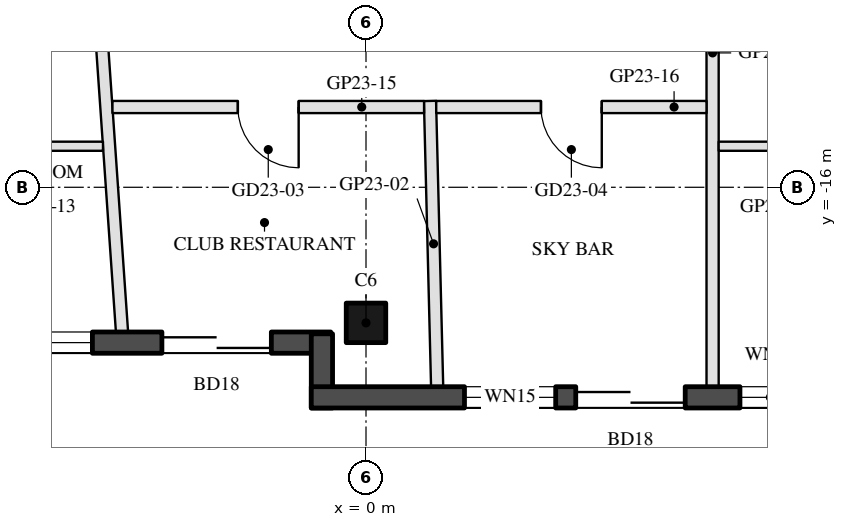
"""IFC4 building model, lengths in metres.
Left out: names, types, materials, properties, quantities, classifications, styles, units other than length and angle.
Written with IfcOpenShell. Run it as: python <this file> out.ifc"""

import sys

from ifc_helpers import new_model, si_unit, direction, frame, frame_2d, origin, origin_2d, place, context, subcontext, project, spatial, rectangle, hollow_rectangle, extrude, boolean, halfspace, element, fill, save


model = new_model("IFC4")
c1 = context("Model", 3, precision=1e-05, world=origin(), true_north=direction((0.0, 1.0)))
c2 = subcontext(c1, "Body", "Model", "MODEL_VIEW")
j1 = project(units=[si_unit("LENGTHUNIT", "METRE"), si_unit("PLANEANGLEUNIT", "RADIAN")], contexts=[c1])
p1 = place(None, origin())
s1 = spatial("IfcSite", under=j1, at=p1, CompositionType="ELEMENT")
p2 = place(p1, origin())
s2 = spatial("IfcBuilding", under=s1, at=p2, CompositionType="ELEMENT")
p3 = place(p2, frame((0.0, 0.0, 250.4)))
s3 = spatial("IfcBuildingStorey", under=s2, at=p3, CompositionType="ELEMENT", Elevation=250.4)
p4 = place(p3, frame((0.0, -18.23, 0.0), z_axis=(0.0, 0.0, 1.0), x_axis=(-1.0, 0.0, 0.0)))
e1 = element("IfcColumn", 1, at=p4, inside=s3, PredefinedType="COLUMN", context=c2, shape_type="SweptSolid", body=[
    boolean("DIFFERENCE", extrude(hollow_rectangle(XDim=0.65, YDim=0.65, WallThickness=0.03, at=origin_2d()), origin(), (0.0, 0.0, 1.0), 3.7), halfspace(frame((0.0, 0.0, 3.663), z_axis=(0.0, 0.0, 1.0), x_axis=(1.0, 0.0, 0.0)), False)),
])
p5 = place(p3, frame((-7.32, -18.555, 0.0), z_axis=(0.0, 0.0, 1.0), x_axis=(1.0, 0.0, 0.0)))
e2 = element("IfcWall", 2, at=p5, inside=s3, PredefinedType="SOLIDWALL", context=c2, shape_type="SweptSolid", body=[
    extrude(rectangle(XDim=6.74, YDim=0.35, at=frame_2d((3.37, 0.0))), origin(), (0.0, 0.0, 1.0), 3.55),
])
p6 = place(p5, frame((0.32, 0.0, 0.3)))
e3 = element("IfcOpeningElement", 3, at=p6, cuts=e2, PredefinedType="OPENING", context=c2, shape_type="SweptSolid", body=[
    extrude(rectangle(XDim=2.5, YDim=2.65, at=frame_2d((1.25, 1.325))), frame((0.0, 0.185, 0.0), z_axis=(0.0, -1.0, 0.0), x_axis=(1.0, 0.0, 0.0)), (0.0, 0.0, 1.0), 0.37),
])
p7 = place(p5, frame((3.963, 0.0, 0.0)))
e4 = element("IfcOpeningElement", 4, at=p7, cuts=e2, PredefinedType="OPENING", context=c2, shape_type="SweptSolid", body=[
    extrude(rectangle(XDim=1.8, YDim=2.4, at=frame_2d((0.9, 1.2))), frame((0.0, 0.185, 0.0), z_axis=(0.0, -1.0, 0.0), x_axis=(1.0, 0.0, 0.0)), (0.0, 0.0, 1.0), 0.37),
])
p8 = place(p3, frame((-0.725, -18.41, 0.0), z_axis=(0.0, 0.0, 1.0), x_axis=(0.0, -1.0, 0.0)))
e5 = element("IfcWall", 5, at=p8, inside=s3, PredefinedType="SOLIDWALL", context=c2, shape_type="SweptSolid", body=[
    extrude(rectangle(XDim=1.22, YDim=0.35, at=frame_2d((0.61, 0.0))), origin(), (0.0, 0.0, 1.0), 3.55),
])
p9 = place(p3, frame((-0.9, -19.455, 0.0), z_axis=(0.0, 0.0, 1.0), x_axis=(1.0, 0.0, 0.0)))
e6 = element("IfcWall", 6, at=p9, inside=s3, PredefinedType="SOLIDWALL", context=c2, shape_type="SweptSolid", body=[
    extrude(rectangle(XDim=9.7, YDim=0.35, at=frame_2d((4.85, 0.0))), origin(), (0.0, 0.0, 1.0), 3.55),
])
p10 = place(p9, frame((4.35, 0.0, 0.0)))
e7 = element("IfcOpeningElement", 7, at=p10, cuts=e6, PredefinedType="OPENING", context=c2, shape_type="SweptSolid", body=[
    extrude(rectangle(XDim=1.8, YDim=2.4, at=frame_2d((0.9, 1.2))), frame((0.0, 0.185, 0.0), z_axis=(0.0, -1.0, 0.0), x_axis=(1.0, 0.0, 0.0)), (0.0, 0.0, 1.0), 0.37),
])
p11 = place(p9, frame((2.52, 0.0, 0.3)))
e8 = element("IfcOpeningElement", 8, at=p11, cuts=e6, PredefinedType="OPENING", context=c2, shape_type="SweptSolid", body=[
    extrude(rectangle(XDim=1.5, YDim=2.65, at=frame_2d((0.75, 1.325))), frame((0.0, 0.185, 0.0), z_axis=(0.0, -1.0, 0.0), x_axis=(1.0, 0.0, 0.0)), (0.0, 0.0, 1.0), 0.37),
])
p12 = place(p9, frame((7.05, 0.0, 0.3)))
e9 = element("IfcOpeningElement", 9, at=p12, cuts=e6, PredefinedType="OPENING", context=c2, shape_type="SweptSolid", body=[
    extrude(rectangle(XDim=1.0, YDim=2.65, at=frame_2d((0.5, 1.325))), frame((0.0, 0.185, 0.0), z_axis=(0.0, -1.0, 0.0), x_axis=(1.0, 0.0, 0.0)), (0.0, 0.0, 1.0), 0.37),
])
p13 = place(p3, frame((-4.013, -18.38, 0.0), z_axis=(0.0, 0.0, 1.0), x_axis=(-0.06939415619, 0.997589319854, 0.0)))
e10 = element("IfcWall", 10, at=p13, inside=s3, PredefinedType="PARTITIONING", context=c2, shape_type="SweptSolid", body=[
    extrude(rectangle(XDim=10.104, YDim=0.2, at=frame_2d((5.052, 0.0))), origin(), (0.0, 0.0, 1.0), 2.95),
])
p14 = place(p3, frame((1.17, -19.28, 0.0), z_axis=(0.0, 0.0, 1.0), x_axis=(-0.025029816209, 0.999686705073, 0.0)))
e11 = element("IfcWall", 11, at=p14, inside=s3, PredefinedType="PARTITIONING", context=c2, shape_type="SweptSolid", body=[
    extrude(rectangle(XDim=4.701, YDim=0.2, at=frame_2d((2.351, 0.0))), origin(), (0.0, 0.0, 1.0), 3.1),
])
p15 = place(p3, frame((5.7, -19.28, 0.0), z_axis=(0.0, 0.0, 1.0), x_axis=(0.0, 1.0, 0.0)))
e12 = element("IfcWall", 12, at=p15, inside=s3, PredefinedType="PARTITIONING", context=c2, shape_type="SweptSolid", body=[
    extrude(rectangle(XDim=10.98, YDim=0.2, at=frame_2d((5.49, 0.0))), origin(), (0.0, 0.0, 1.0), 3.1),
])
p16 = place(p3, frame((-6.365, -15.325, 0.0), z_axis=(0.0, 0.0, 1.0), x_axis=(1.0, 0.0, 0.0)))
e13 = element("IfcWall", 13, at=p16, inside=s3, PredefinedType="PARTITIONING", context=c2, shape_type="SweptSolid", body=[
    extrude(rectangle(XDim=2.04, YDim=0.15, at=frame_2d((1.02, 0.0))), origin(), (0.0, 0.0, 1.0), 3.55),
])
p17 = place(p3, frame((0.955, -14.68, 0.0), z_axis=(0.0, 0.0, 1.0), x_axis=(-1.0, 0.0, 0.0)))
e14 = element("IfcWall", 14, at=p17, inside=s3, PredefinedType="PARTITIONING", context=c2, shape_type="SweptSolid", body=[
    extrude(rectangle(XDim=5.125, YDim=0.2, at=frame_2d((2.562, 0.0))), origin(), (0.0, 0.0, 1.0), 2.95),
])
p18 = place(p17, frame((2.062, 0.0, 0.0)))
e15 = element("IfcOpeningElement", 15, at=p18, cuts=e14, PredefinedType="OPENING", context=c2, shape_type="SweptSolid", body=[
    extrude(rectangle(XDim=1.0, YDim=2.1, at=frame_2d((0.5, 1.05))), frame((0.0, 0.11, 0.0), z_axis=(0.0, -1.0, 0.0), x_axis=(1.0, 0.0, 0.0)), (0.0, 0.0, 1.0), 0.22),
])
p19 = place(p3, frame((5.6, -14.68, 0.0), z_axis=(0.0, 0.0, 1.0), x_axis=(-1.0, 0.0, 0.0)))
e16 = element("IfcWall", 16, at=p19, inside=s3, PredefinedType="PARTITIONING", context=c2, shape_type="SweptSolid", body=[
    extrude(rectangle(XDim=4.445, YDim=0.2, at=frame_2d((2.223, 0.0))), origin(), (0.0, 0.0, 1.0), 2.95),
])
p20 = place(p19, frame((1.723, 0.0, 0.0)))
e17 = element("IfcOpeningElement", 17, at=p20, cuts=e16, PredefinedType="OPENING", context=c2, shape_type="SweptSolid", body=[
    extrude(rectangle(XDim=1.0, YDim=2.1, at=frame_2d((0.5, 1.05))), frame((0.0, 0.11, 0.0), z_axis=(0.0, -1.0, 0.0), x_axis=(1.0, 0.0, 0.0)), (0.0, 0.0, 1.0), 0.22),
])
p21 = place(p3, frame((5.8, -15.325, 0.0), z_axis=(0.0, 0.0, 1.0), x_axis=(1.0, 0.0, 0.0)))
e18 = element("IfcWall", 18, at=p21, inside=s3, PredefinedType="PARTITIONING", context=c2, shape_type="SweptSolid", body=[
    extrude(rectangle(XDim=1.85, YDim=0.15, at=frame_2d((0.925, 0.0))), origin(), (0.0, 0.0, 1.0), 3.55),
])
p22 = place(p6, origin())
e19 = element("IfcWindow", 19, at=p22, inside=s3, PartitioningType="SINGLE_PANEL", PredefinedType="WINDOW", context=c2, shape_type="SweptSolid", body=[
    extrude(rectangle(XDim=2.5, YDim=2.65, at=frame_2d((1.25, 1.325))), frame((0.0, 0.03, 0.0), z_axis=(0.0, -1.0, 0.0), x_axis=(1.0, 0.0, 0.0)), (0.0, 0.0, 1.0), 0.06),
])
fill(e3, e19)
p23 = place(p7, frame((1.8, 0.0, 0.0), z_axis=(0.0, 0.0, 1.0), x_axis=(-1.0, 0.0, 0.0)))
e20 = element("IfcDoor", 20, at=p23, inside=s3, OperationType="SLIDING_TO_LEFT", PredefinedType="DOOR", context=c2, shape_type="SweptSolid", body=[
    extrude(rectangle(XDim=1.8, YDim=2.4, at=frame_2d((0.9, 1.2))), frame((0.0, 0.025, 0.0), z_axis=(0.0, -1.0, 0.0), x_axis=(1.0, 0.0, 0.0)), (0.0, 0.0, 1.0), 0.05),
])
fill(e4, e20)
p24 = place(p10, frame((1.8, 0.0, 0.0), z_axis=(0.0, 0.0, 1.0), x_axis=(-1.0, 0.0, 0.0)))
e21 = element("IfcDoor", 21, at=p24, inside=s3, OperationType="SLIDING_TO_LEFT", PredefinedType="DOOR", context=c2, shape_type="SweptSolid", body=[
    extrude(rectangle(XDim=1.8, YDim=2.4, at=frame_2d((0.9, 1.2))), frame((0.0, 0.025, 0.0), z_axis=(0.0, -1.0, 0.0), x_axis=(1.0, 0.0, 0.0)), (0.0, 0.0, 1.0), 0.05),
])
fill(e7, e21)
p25 = place(p11, origin())
e22 = element("IfcWindow", 22, at=p25, inside=s3, PartitioningType="SINGLE_PANEL", PredefinedType="WINDOW", context=c2, shape_type="SweptSolid", body=[
    extrude(rectangle(XDim=1.5, YDim=2.65, at=frame_2d((0.75, 1.325))), frame((0.0, 0.03, 0.0), z_axis=(0.0, -1.0, 0.0), x_axis=(1.0, 0.0, 0.0)), (0.0, 0.0, 1.0), 0.06),
])
fill(e8, e22)
p26 = place(p12, origin())
e23 = element("IfcWindow", 23, at=p26, inside=s3, PartitioningType="SINGLE_PANEL", PredefinedType="WINDOW", context=c2, shape_type="SweptSolid", body=[
    extrude(rectangle(XDim=1.0, YDim=2.65, at=frame_2d((0.5, 1.325))), frame((0.0, 0.03, 0.0), z_axis=(0.0, -1.0, 0.0), x_axis=(1.0, 0.0, 0.0)), (0.0, 0.0, 1.0), 0.06),
])
fill(e9, e23)
p27 = place(p18, origin())
e24 = element("IfcDoor", 24, at=p27, inside=s3, OperationType="SINGLE_SWING_LEFT", PredefinedType="DOOR", context=c2, shape_type="SweptSolid", body=[
    extrude(rectangle(XDim=1.0, YDim=2.1, at=frame_2d((0.5, 1.05))), frame((0.0, 0.025, 0.0), z_axis=(0.0, -1.0, 0.0), x_axis=(1.0, 0.0, 0.0)), (0.0, 0.0, 1.0), 0.05),
])
fill(e15, e24)
p28 = place(p20, origin())
e25 = element("IfcDoor", 25, at=p28, inside=s3, OperationType="SINGLE_SWING_LEFT", PredefinedType="DOOR", context=c2, shape_type="SweptSolid", body=[
    extrude(rectangle(XDim=1.0, YDim=2.1, at=frame_2d((0.5, 1.05))), frame((0.0, 0.025, 0.0), z_axis=(0.0, -1.0, 0.0), x_axis=(1.0, 0.0, 0.0)), (0.0, 0.0, 1.0), 0.05),
])
fill(e17, e25)
save(model, sys.argv[1])
